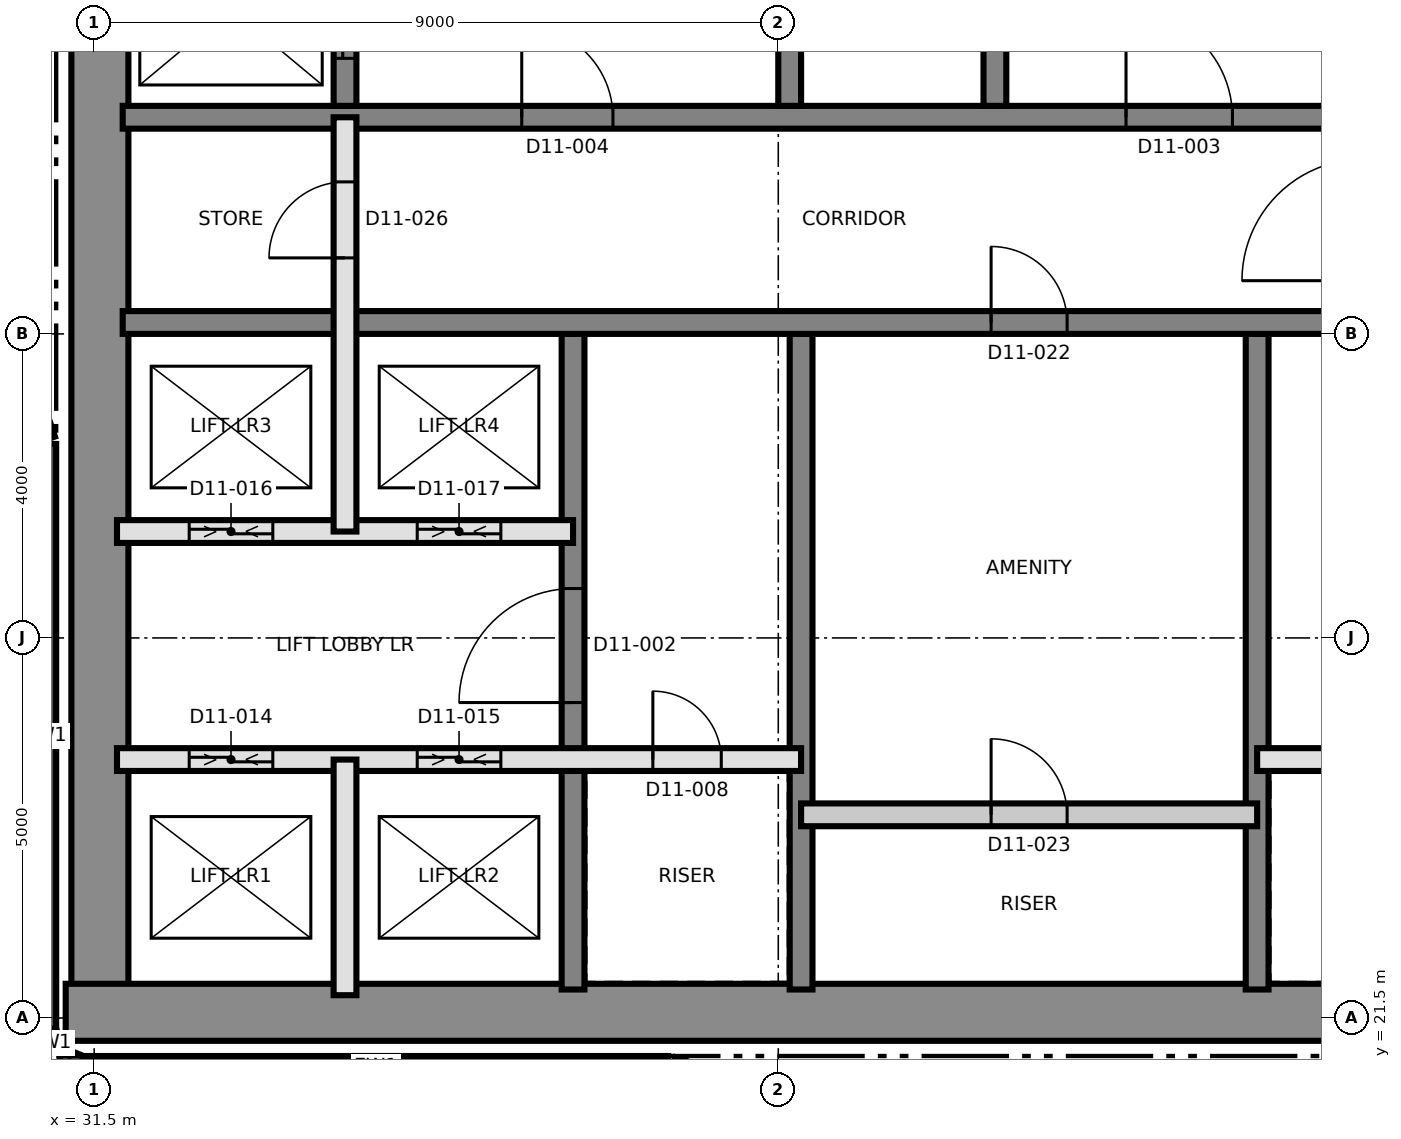
"""IFC4 building model, lengths in metres.
Left out: names, types, materials, properties, quantities, classifications, styles, units other than length and angle.
Written with IfcOpenShell. Run it as: python <this file> out.ifc"""

import sys

from ifc_helpers import new_model, si_unit, direction, frame, frame_2d, origin, place, context, subcontext, project, spatial, rectangle, extrude, element, fill, save


model = new_model("IFC4")
c1 = context("Model", 3, precision=1e-05, world=origin(), true_north=direction((0.0, 1.0)))
c2 = subcontext(c1, "Body", "Model", "MODEL_VIEW")
j1 = project(units=[si_unit("LENGTHUNIT", "METRE"), si_unit("PLANEANGLEUNIT", "RADIAN")], contexts=[c1])
p1 = place(None, origin())
s1 = spatial("IfcSite", under=j1, at=p1, CompositionType="ELEMENT")
p2 = place(p1, origin())
s2 = spatial("IfcBuilding", under=s1, at=p2, CompositionType="ELEMENT")
p3 = place(p2, frame((0.0, 0.0, 124.1)))
s3 = spatial("IfcBuildingStorey", under=s2, at=p3, CompositionType="ELEMENT", Elevation=124.1)
p4 = place(p3, frame((31.575, 21.875, 0.0), z_axis=(0.0, 0.0, 1.0), x_axis=(0.0, 1.0, 0.0)))
e1 = element("IfcWall", 1, at=p4, inside=s3, PredefinedType="SHEAR", context=c2, shape_type="SweptSolid", body=[
    extrude(rectangle(XDim=17.25, YDim=0.75, at=frame_2d((8.625, 0.0))), origin(), (0.0, 0.0, 1.0), 3.7),
])
p5 = place(p3, frame((31.125, 21.575, 0.0), z_axis=(0.0, 0.0, 1.0), x_axis=(1.0, 0.0, 0.0)))
e2 = element("IfcWall", 2, at=p5, inside=s3, PredefinedType="SHEAR", context=c2, shape_type="SweptSolid", body=[
    extrude(rectangle(XDim=27.0, YDim=0.75, at=frame_2d((13.5, 0.0))), origin(), (0.0, 0.0, 1.0), 3.7),
])
p6 = place(p3, frame((37.8, 21.875, 0.0), z_axis=(0.0, 0.0, 1.0), x_axis=(0.0, 1.0, 0.0)))
e3 = element("IfcWall", 3, at=p6, inside=s3, PredefinedType="SHEAR", context=c2, shape_type="SweptSolid", body=[
    extrude(rectangle(XDim=8.625, YDim=0.3, at=frame_2d((4.312, 0.0))), origin(), (0.0, 0.0, 1.0), 3.7),
])
p7 = place(p6, frame((3.775, 0.0, 0.0)))
e4 = element("IfcOpeningElement", 4, at=p7, cuts=e3, PredefinedType="OPENING", context=c2, shape_type="SweptSolid", body=[
    extrude(rectangle(XDim=1.5, YDim=2.1, at=frame_2d((0.75, 1.05))), frame((0.0, 0.16, 0.0), z_axis=(0.0, -1.0, 0.0), x_axis=(1.0, 0.0, 0.0)), (0.0, 0.0, 1.0), 0.32),
])
for number, where, z_axis, x_axis in (
    (5, (40.8, 21.875, 0.0), (0.0, 0.0, 1.0), (0.0, 1.0, 0.0)),
    (6, (46.8, 21.875, 0.0), (0.0, 0.0, 1.0), (0.0, 1.0, 0.0)),
):
    element("IfcWall", number, at=place(p3, frame(where, z_axis=z_axis, x_axis=x_axis)), inside=s3, PredefinedType="SHEAR", context=c2, shape_type="SweptSolid", body=[
        extrude(rectangle(XDim=8.625, YDim=0.3, at=frame_2d((4.312, 0.0))), origin(), (0.0, 0.0, 1.0), 3.7),
    ])
p8 = place(p3, frame((31.875, 30.65, 0.0), z_axis=(0.0, 0.0, 1.0), x_axis=(1.0, 0.0, 0.0)))
e7 = element("IfcWall", 7, at=p8, inside=s3, PredefinedType="SHEAR", context=c2, shape_type="SweptSolid", body=[
    extrude(rectangle(XDim=26.25, YDim=0.3, at=frame_2d((13.125, 0.0))), origin(), (0.0, 0.0, 1.0), 3.7),
])
p9 = place(p8, frame((24.625, 0.0, 0.0)))
e8 = element("IfcOpeningElement", 8, at=p9, cuts=e7, PredefinedType="OPENING", context=c2, shape_type="SweptSolid", body=[
    extrude(rectangle(XDim=1.0, YDim=2.1, at=frame_2d((0.5, 1.05))), frame((0.0, 0.16, 0.0), z_axis=(0.0, -1.0, 0.0), x_axis=(1.0, 0.0, 0.0)), (0.0, 0.0, 1.0), 0.32),
])
p10 = place(p8, frame((11.425, 0.0, 0.0)))
e9 = element("IfcOpeningElement", 9, at=p10, cuts=e7, PredefinedType="OPENING", context=c2, shape_type="SweptSolid", body=[
    extrude(rectangle(XDim=1.0, YDim=2.1, at=frame_2d((0.5, 1.05))), frame((0.0, 0.16, 0.0), z_axis=(0.0, -1.0, 0.0), x_axis=(1.0, 0.0, 0.0)), (0.0, 0.0, 1.0), 0.32),
])
p11 = place(p3, frame((31.875, 33.35, 0.0), z_axis=(0.0, 0.0, 1.0), x_axis=(1.0, 0.0, 0.0)))
e10 = element("IfcWall", 10, at=p11, inside=s3, PredefinedType="SHEAR", context=c2, shape_type="SweptSolid", body=[
    extrude(rectangle(XDim=26.25, YDim=0.3, at=frame_2d((13.125, 0.0))), origin(), (0.0, 0.0, 1.0), 3.7),
])
p12 = place(p11, frame((13.2, 0.0, 0.0)))
e11 = element("IfcOpeningElement", 11, at=p12, cuts=e10, PredefinedType="OPENING", context=c2, shape_type="SweptSolid", body=[
    extrude(rectangle(XDim=1.4, YDim=2.1, at=frame_2d((0.7, 1.05))), frame((0.0, 0.16, 0.0), z_axis=(0.0, -1.0, 0.0), x_axis=(1.0, 0.0, 0.0)), (0.0, 0.0, 1.0), 0.32),
])
p13 = place(p11, frame((5.25, 0.0, 0.0)))
e12 = element("IfcOpeningElement", 12, at=p13, cuts=e10, PredefinedType="OPENING", context=c2, shape_type="SweptSolid", body=[
    extrude(rectangle(XDim=1.2, YDim=2.1, at=frame_2d((0.6, 1.05))), frame((0.0, 0.16, 0.0), z_axis=(0.0, -1.0, 0.0), x_axis=(1.0, 0.0, 0.0)), (0.0, 0.0, 1.0), 0.32),
])
p14 = place(p11, frame((19.8, 0.0, 0.0)))
e13 = element("IfcOpeningElement", 13, at=p14, cuts=e10, PredefinedType="OPENING", context=c2, shape_type="SweptSolid", body=[
    extrude(rectangle(XDim=1.2, YDim=2.1, at=frame_2d((0.6, 1.05))), frame((0.0, 0.16, 0.0), z_axis=(0.0, -1.0, 0.0), x_axis=(1.0, 0.0, 0.0)), (0.0, 0.0, 1.0), 0.32),
])
for number, where, z_axis, x_axis in (
    (14, (40.65, 33.5, 0.0), (0.0, 0.0, 1.0), (0.0, 1.0, 0.0)),
    (15, (43.35, 33.5, 0.0), (0.0, 0.0, 1.0), (0.0, 1.0, 0.0)),
):
    element("IfcWall", number, at=place(p3, frame(where, z_axis=z_axis, x_axis=x_axis)), inside=s3, PredefinedType="SHEAR", context=c2, shape_type="SweptSolid", body=[
        extrude(rectangle(XDim=5.625, YDim=0.3, at=frame_2d((2.812, 0.0))), origin(), (0.0, 0.0, 1.0), 3.7),
    ])
p15 = place(p3, frame((34.8, 33.5, 0.0), z_axis=(0.0, 0.0, 1.0), x_axis=(0.0, 1.0, 0.0)))
e16 = element("IfcWall", 16, at=p15, inside=s3, PredefinedType="SHEAR", context=c2, shape_type="SweptSolid", body=[
    extrude(rectangle(XDim=2.55, YDim=0.3, at=frame_2d((1.275, 0.0))), origin(), (0.0, 0.0, 1.0), 3.7),
])
p16 = place(p15, frame((0.625, 0.0, 0.0)))
e17 = element("IfcOpeningElement", 17, at=p16, cuts=e16, PredefinedType="OPENING", context=c2, shape_type="SweptSolid", body=[
    extrude(rectangle(XDim=1.3, YDim=2.4, at=frame_2d((0.65, 1.2))), frame((0.0, 0.16, 0.0), z_axis=(0.0, -1.0, 0.0), x_axis=(1.0, 0.0, 0.0)), (0.0, 0.0, 1.0), 0.32),
])
p17 = place(p3, frame((30.85, 29.052, 0.0), z_axis=(0.0, 0.0, 1.0), x_axis=(0.0, -1.0, 0.0)))
e18 = element("IfcWall", 18, at=p17, inside=s3, PredefinedType="SOLIDWALL", context=c2, shape_type="SweptSolid", body=[
    extrude(rectangle(XDim=7.693, YDim=0.3, at=frame_2d((3.846, 0.0))), origin(), (0.0, 0.0, 1.0), 3.4),
])
for number, where, z_axis, x_axis in (
    (19, (30.861, 21.302, 0.0), (0.0, 0.0, 1.0), (0.383, -0.924, 0.0)),
    (20, (31.048, 20.967, 0.0), (0.0, 0.0, 1.0), (0.924, -0.383, 0.0)),
):
    element("IfcWall", number, at=place(p3, frame(where, z_axis=z_axis, x_axis=x_axis)), inside=s3, PredefinedType="SOLIDWALL", context=c2, shape_type="SweptSolid", body=[
        extrude(rectangle(XDim=0.275, YDim=0.3, at=frame_2d((0.138, 0.0))), origin(), (0.0, 0.0, 1.0), 3.4),
    ])
p18 = place(p3, frame((31.36, 20.85, 0.0), z_axis=(0.0, 0.0, 1.0), x_axis=(1.0, 0.0, 0.0)))
e21 = element("IfcWall", 21, at=p18, inside=s3, PredefinedType="SOLIDWALL", context=c2, shape_type="SweptSolid", body=[
    extrude(rectangle(XDim=7.693, YDim=0.3, at=frame_2d((3.846, 0.0))), origin(), (0.0, 0.0, 1.0), 3.4),
])
for number, where, z_axis, x_axis in (
    (22, (39.101, 20.842, 0.0), (0.0, 0.0, 1.0), (0.947, -0.321, 0.0)),
    (23, (30.418, 30.351, 0.0), (0.0, 0.0, 1.0), (0.321, -0.947, 0.0)),
):
    element("IfcWall", number, at=place(p3, frame(where, z_axis=z_axis, x_axis=x_axis)), inside=s3, PredefinedType="SOLIDWALL", context=c2, shape_type="SweptSolid", body=[
        extrude(rectangle(XDim=1.32, YDim=0.3, at=frame_2d((0.66, 0.0))), origin(), (0.0, 0.0, 1.0), 3.4),
    ])
p19 = place(p3, frame((40.8, 24.173, 0.0), z_axis=(0.0, 0.0, 1.0), x_axis=(1.0, 0.0, 0.0)))
e24 = element("IfcWall", 24, at=p19, inside=s3, PredefinedType="PARTITIONING", context=c2, shape_type="SweptSolid", body=[
    extrude(rectangle(XDim=6.0, YDim=0.3, at=frame_2d((3.0, 0.0))), origin(), (0.0, 0.0, 1.0), 3.4),
])
p20 = place(p19, frame((2.5, 0.0, 0.0)))
e25 = element("IfcOpeningElement", 25, at=p20, cuts=e24, PredefinedType="OPENING", context=c2, shape_type="SweptSolid", body=[
    extrude(rectangle(XDim=1.0, YDim=2.1, at=frame_2d((0.5, 1.05))), frame((0.0, 0.16, 0.0), z_axis=(0.0, -1.0, 0.0), x_axis=(1.0, 0.0, 0.0)), (0.0, 0.0, 1.0), 0.32),
])
p21 = place(p3, frame((31.8, 24.9, 0.0), z_axis=(0.0, 0.0, 1.0), x_axis=(1.0, 0.0, 0.0)))
e26 = element("IfcWall", 26, at=p21, inside=s3, PredefinedType="SOLIDWALL", context=c2, shape_type="SweptSolid", body=[
    extrude(rectangle(XDim=9.0, YDim=0.3, at=frame_2d((4.5, 0.0))), origin(), (0.0, 0.0, 1.0), 3.4),
])
p22 = place(p21, frame((7.05, 0.0, 0.0)))
e27 = element("IfcOpeningElement", 27, at=p22, cuts=e26, PredefinedType="OPENING", context=c2, shape_type="SweptSolid", body=[
    extrude(rectangle(XDim=0.9, YDim=2.1, at=frame_2d((0.45, 1.05))), frame((0.0, 0.16, 0.0), z_axis=(0.0, -1.0, 0.0), x_axis=(1.0, 0.0, 0.0)), (0.0, 0.0, 1.0), 0.32),
])
p23 = place(p21, frame((0.95, 0.0, 0.0)))
e28 = element("IfcOpeningElement", 28, at=p23, cuts=e26, PredefinedType="OPENING", context=c2, shape_type="SweptSolid", body=[
    extrude(rectangle(XDim=1.1, YDim=2.4, at=frame_2d((0.55, 1.2))), frame((0.0, 0.16, 0.0), z_axis=(0.0, -1.0, 0.0), x_axis=(1.0, 0.0, 0.0)), (0.0, 0.0, 1.0), 0.32),
])
p24 = place(p21, frame((3.95, 0.0, 0.0)))
e29 = element("IfcOpeningElement", 29, at=p24, cuts=e26, PredefinedType="OPENING", context=c2, shape_type="SweptSolid", body=[
    extrude(rectangle(XDim=1.1, YDim=2.4, at=frame_2d((0.55, 1.2))), frame((0.0, 0.16, 0.0), z_axis=(0.0, -1.0, 0.0), x_axis=(1.0, 0.0, 0.0)), (0.0, 0.0, 1.0), 0.32),
])
p25 = place(p3, frame((46.8, 24.9, 0.0), z_axis=(0.0, 0.0, 1.0), x_axis=(1.0, 0.0, 0.0)))
e30 = element("IfcWall", 30, at=p25, inside=s3, PredefinedType="SOLIDWALL", context=c2, shape_type="SweptSolid", body=[
    extrude(rectangle(XDim=9.0, YDim=0.3, at=frame_2d((4.5, 0.0))), origin(), (0.0, 0.0, 1.0), 3.4),
])
p26 = place(p25, frame((1.75, 0.0, 0.0)))
e31 = element("IfcOpeningElement", 31, at=p26, cuts=e30, PredefinedType="OPENING", context=c2, shape_type="SweptSolid", body=[
    extrude(rectangle(XDim=0.9, YDim=2.1, at=frame_2d((0.45, 1.05))), frame((0.0, 0.16, 0.0), z_axis=(0.0, -1.0, 0.0), x_axis=(1.0, 0.0, 0.0)), (0.0, 0.0, 1.0), 0.32),
])
p27 = place(p3, frame((31.8, 27.9, 0.0), z_axis=(0.0, 0.0, 1.0), x_axis=(1.0, 0.0, 0.0)))
e32 = element("IfcWall", 32, at=p27, inside=s3, PredefinedType="SOLIDWALL", context=c2, shape_type="SweptSolid", body=[
    extrude(rectangle(XDim=6.0, YDim=0.3, at=frame_2d((3.0, 0.0))), origin(), (0.0, 0.0, 1.0), 3.4),
])
p28 = place(p27, frame((0.95, 0.0, 0.0)))
e33 = element("IfcOpeningElement", 33, at=p28, cuts=e32, PredefinedType="OPENING", context=c2, shape_type="SweptSolid", body=[
    extrude(rectangle(XDim=1.1, YDim=2.4, at=frame_2d((0.55, 1.2))), frame((0.0, 0.16, 0.0), z_axis=(0.0, -1.0, 0.0), x_axis=(1.0, 0.0, 0.0)), (0.0, 0.0, 1.0), 0.32),
])
p29 = place(p27, frame((3.95, 0.0, 0.0)))
e34 = element("IfcOpeningElement", 34, at=p29, cuts=e32, PredefinedType="OPENING", context=c2, shape_type="SweptSolid", body=[
    extrude(rectangle(XDim=1.1, YDim=2.4, at=frame_2d((0.55, 1.2))), frame((0.0, 0.16, 0.0), z_axis=(0.0, -1.0, 0.0), x_axis=(1.0, 0.0, 0.0)), (0.0, 0.0, 1.0), 0.32),
])
p30 = place(p3, frame((34.8, 21.8, 0.0), z_axis=(0.0, 0.0, 1.0), x_axis=(0.0, 1.0, 0.0)))
e35 = element("IfcWall", 35, at=p30, inside=s3, PredefinedType="SOLIDWALL", context=c2, shape_type="SweptSolid", body=[
    extrude(rectangle(XDim=3.1, YDim=0.3, at=frame_2d((1.55, 0.0))), origin(), (0.0, 0.0, 1.0), 3.4),
])
p31 = place(p3, frame((34.8, 27.9, 0.0), z_axis=(0.0, 0.0, 1.0), x_axis=(0.0, 1.0, 0.0)))
e36 = element("IfcWall", 36, at=p31, inside=s3, PredefinedType="SOLIDWALL", context=c2, shape_type="SweptSolid", body=[
    extrude(rectangle(XDim=5.45, YDim=0.3, at=frame_2d((2.725, 0.0))), origin(), (0.0, 0.0, 1.0), 3.4),
])
p32 = place(p31, frame((3.6, 0.0, 0.0)))
e37 = element("IfcOpeningElement", 37, at=p32, cuts=e36, PredefinedType="OPENING", context=c2, shape_type="SweptSolid", body=[
    extrude(rectangle(XDim=1.0, YDim=2.1, at=frame_2d((0.5, 1.05))), frame((0.0, 0.16, 0.0), z_axis=(0.0, -1.0, 0.0), x_axis=(1.0, 0.0, 0.0)), (0.0, 0.0, 1.0), 0.32),
])
p33 = place(p7, origin())
e38 = element("IfcDoor", 38, at=p33, inside=s3, OperationType="SINGLE_SWING_LEFT", PredefinedType="DOOR", context=c2, shape_type="SweptSolid", body=[
    extrude(rectangle(XDim=1.5, YDim=2.1, at=frame_2d((0.75, 1.05))), frame((0.0, 0.025, 0.0), z_axis=(0.0, -1.0, 0.0), x_axis=(1.0, 0.0, 0.0)), (0.0, 0.0, 1.0), 0.05),
])
fill(e4, e38)
p34 = place(p12, origin())
e39 = element("IfcDoor", 39, at=p34, inside=s3, OperationType="SINGLE_SWING_RIGHT", PredefinedType="DOOR", context=c2, shape_type="SweptSolid", body=[
    extrude(rectangle(XDim=1.4, YDim=2.1, at=frame_2d((0.7, 1.05))), frame((0.0, 0.025, 0.0), z_axis=(0.0, -1.0, 0.0), x_axis=(1.0, 0.0, 0.0)), (0.0, 0.0, 1.0), 0.05),
])
fill(e11, e39)
p35 = place(p13, origin())
e40 = element("IfcDoor", 40, at=p35, inside=s3, OperationType="SINGLE_SWING_LEFT", PredefinedType="DOOR", context=c2, shape_type="SweptSolid", body=[
    extrude(rectangle(XDim=1.2, YDim=2.1, at=frame_2d((0.6, 1.05))), frame((0.0, 0.025, 0.0), z_axis=(0.0, -1.0, 0.0), x_axis=(1.0, 0.0, 0.0)), (0.0, 0.0, 1.0), 0.05),
])
fill(e12, e40)
p36 = place(p22, origin())
e41 = element("IfcDoor", 41, at=p36, inside=s3, OperationType="SINGLE_SWING_LEFT", PredefinedType="DOOR", context=c2, shape_type="SweptSolid", body=[
    extrude(rectangle(XDim=0.9, YDim=2.1, at=frame_2d((0.45, 1.05))), frame((0.0, 0.025, 0.0), z_axis=(0.0, -1.0, 0.0), x_axis=(1.0, 0.0, 0.0)), (0.0, 0.0, 1.0), 0.05),
])
fill(e27, e41)
p37 = place(p23, origin())
e42 = element("IfcDoor", 42, at=p37, inside=s3, OperationType="SLIDING_TO_LEFT", PredefinedType="DOOR", context=c2, shape_type="SweptSolid", body=[
    extrude(rectangle(XDim=1.1, YDim=2.4, at=frame_2d((0.55, 1.2))), frame((0.0, 0.025, 0.0), z_axis=(0.0, -1.0, 0.0), x_axis=(1.0, 0.0, 0.0)), (0.0, 0.0, 1.0), 0.05),
])
fill(e28, e42)
p38 = place(p24, origin())
e43 = element("IfcDoor", 43, at=p38, inside=s3, OperationType="SLIDING_TO_LEFT", PredefinedType="DOOR", context=c2, shape_type="SweptSolid", body=[
    extrude(rectangle(XDim=1.1, YDim=2.4, at=frame_2d((0.55, 1.2))), frame((0.0, 0.025, 0.0), z_axis=(0.0, -1.0, 0.0), x_axis=(1.0, 0.0, 0.0)), (0.0, 0.0, 1.0), 0.05),
])
fill(e29, e43)
p39 = place(p28, origin())
e44 = element("IfcDoor", 44, at=p39, inside=s3, OperationType="SLIDING_TO_LEFT", PredefinedType="DOOR", context=c2, shape_type="SweptSolid", body=[
    extrude(rectangle(XDim=1.1, YDim=2.4, at=frame_2d((0.55, 1.2))), frame((0.0, 0.025, 0.0), z_axis=(0.0, -1.0, 0.0), x_axis=(1.0, 0.0, 0.0)), (0.0, 0.0, 1.0), 0.05),
])
fill(e33, e44)
p40 = place(p29, origin())
e45 = element("IfcDoor", 45, at=p40, inside=s3, OperationType="SLIDING_TO_LEFT", PredefinedType="DOOR", context=c2, shape_type="SweptSolid", body=[
    extrude(rectangle(XDim=1.1, YDim=2.4, at=frame_2d((0.55, 1.2))), frame((0.0, 0.025, 0.0), z_axis=(0.0, -1.0, 0.0), x_axis=(1.0, 0.0, 0.0)), (0.0, 0.0, 1.0), 0.05),
])
fill(e34, e45)
p41 = place(p16, origin())
e46 = element("IfcDoor", 46, at=p41, inside=s3, OperationType="SLIDING_TO_LEFT", PredefinedType="DOOR", context=c2, shape_type="SweptSolid", body=[
    extrude(rectangle(XDim=1.3, YDim=2.4, at=frame_2d((0.65, 1.2))), frame((0.0, 0.025, 0.0), z_axis=(0.0, -1.0, 0.0), x_axis=(1.0, 0.0, 0.0)), (0.0, 0.0, 1.0), 0.05),
])
fill(e17, e46)
p42 = place(p10, origin())
e47 = element("IfcDoor", 47, at=p42, inside=s3, OperationType="SINGLE_SWING_LEFT", PredefinedType="DOOR", context=c2, shape_type="SweptSolid", body=[
    extrude(rectangle(XDim=1.0, YDim=2.1, at=frame_2d((0.5, 1.05))), frame((0.0, 0.025, 0.0), z_axis=(0.0, -1.0, 0.0), x_axis=(1.0, 0.0, 0.0)), (0.0, 0.0, 1.0), 0.05),
])
fill(e9, e47)
p43 = place(p20, origin())
e48 = element("IfcDoor", 48, at=p43, inside=s3, OperationType="SINGLE_SWING_RIGHT", PredefinedType="DOOR", context=c2, shape_type="SweptSolid", body=[
    extrude(rectangle(XDim=1.0, YDim=2.1, at=frame_2d((0.5, 1.05))), frame((0.0, 0.025, 0.0), z_axis=(0.0, -1.0, 0.0), x_axis=(1.0, 0.0, 0.0)), (0.0, 0.0, 1.0), 0.05),
])
fill(e25, e48)
p44 = place(p32, origin())
e49 = element("IfcDoor", 49, at=p44, inside=s3, OperationType="SINGLE_SWING_LEFT", PredefinedType="DOOR", context=c2, shape_type="SweptSolid", body=[
    extrude(rectangle(XDim=1.0, YDim=2.1, at=frame_2d((0.5, 1.05))), frame((0.0, 0.025, 0.0), z_axis=(0.0, -1.0, 0.0), x_axis=(1.0, 0.0, 0.0)), (0.0, 0.0, 1.0), 0.05),
])
fill(e37, e49)
save(model, sys.argv[1])
